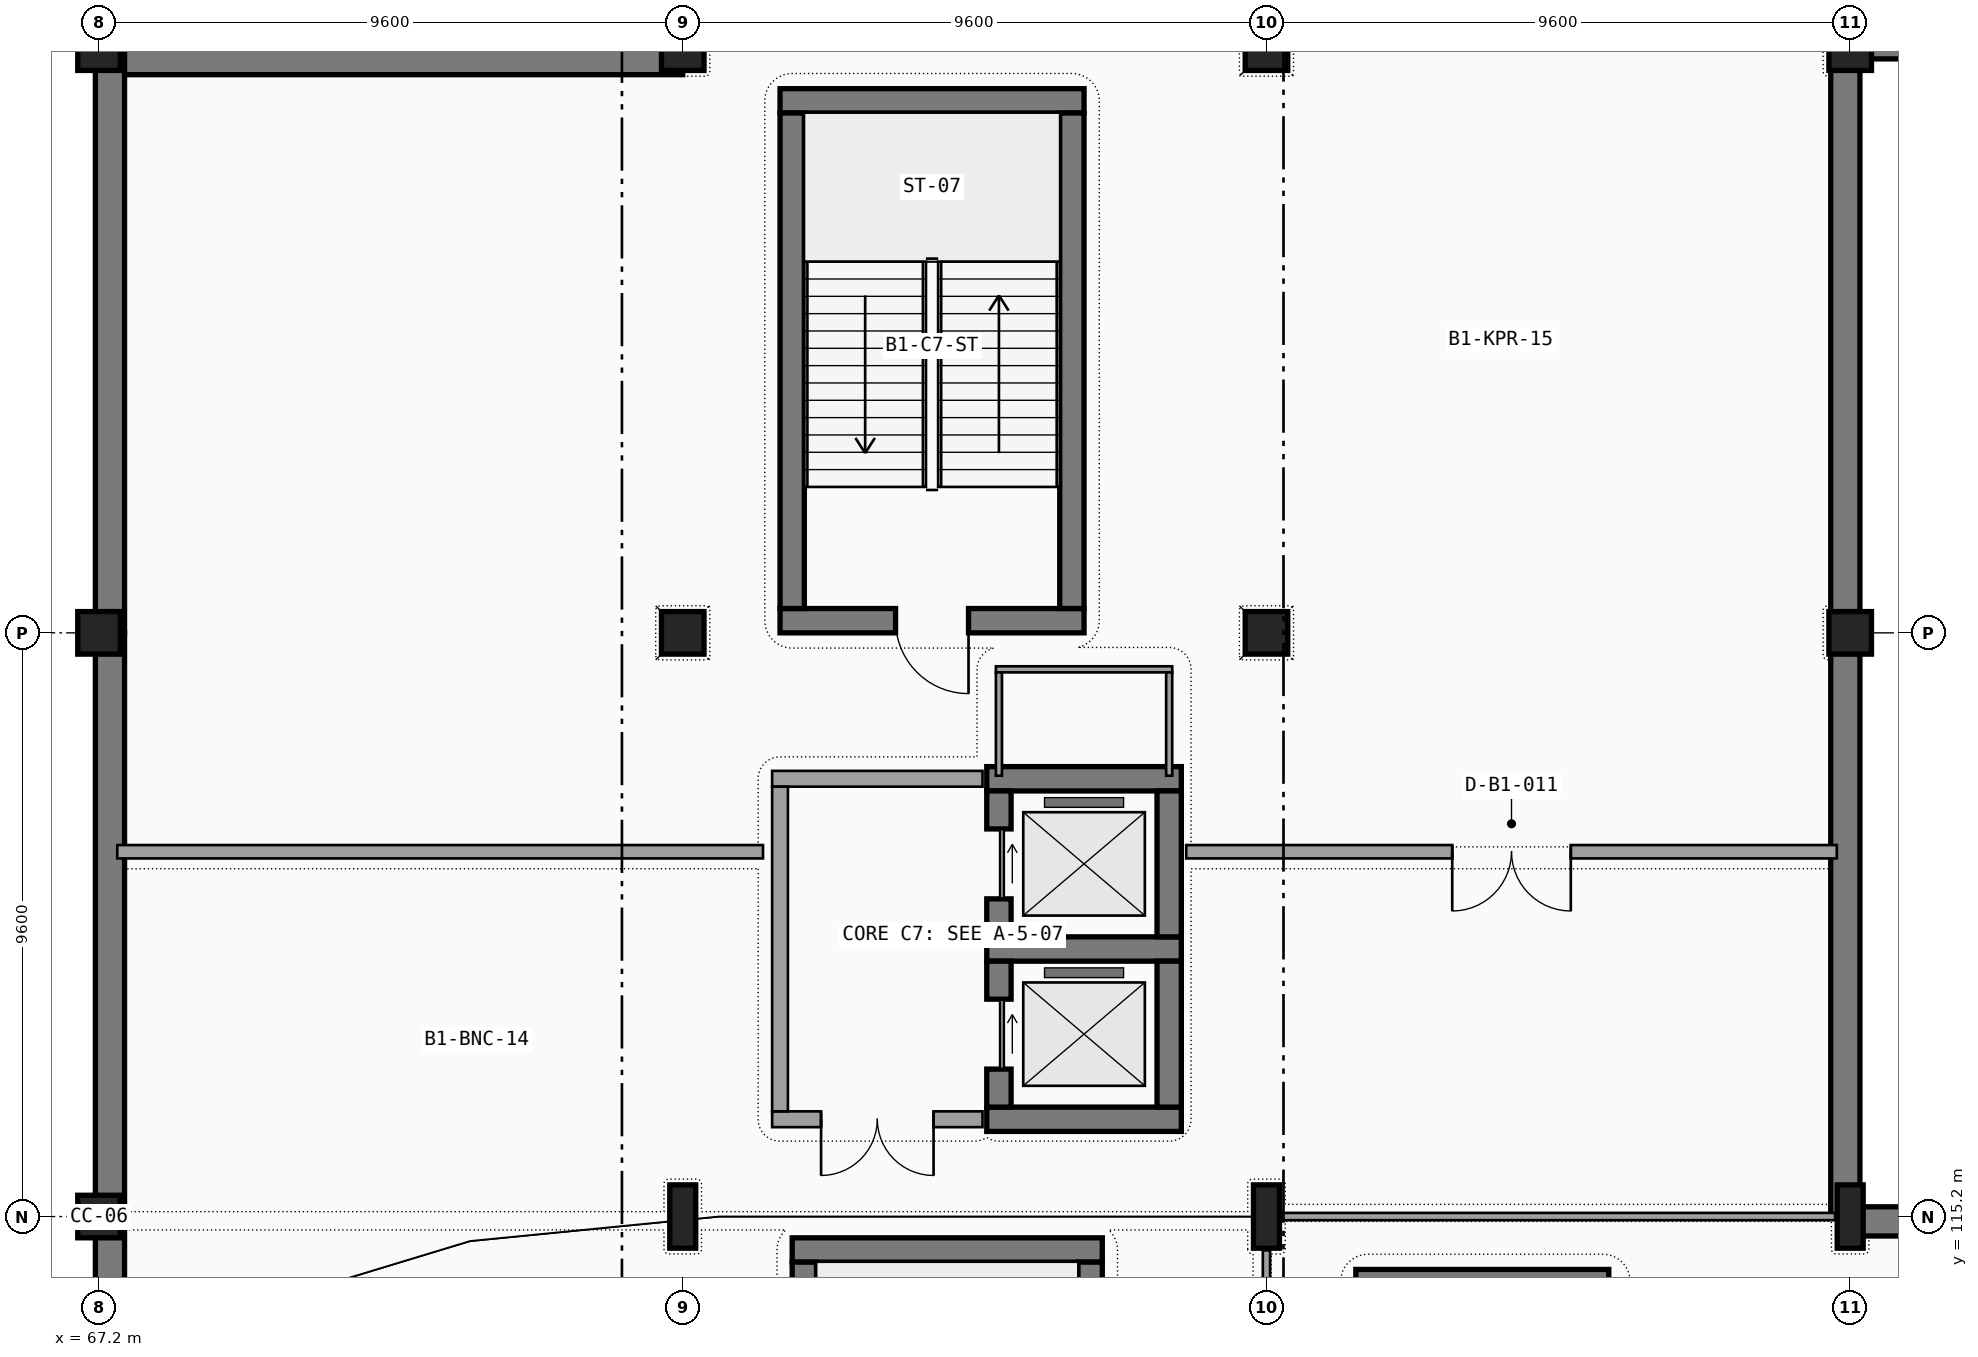
"""IFC4 building model, lengths in metres.
Left out: names, types, materials, properties, quantities, classifications, styles, units other than length and angle.
Written with IfcOpenShell. Run it as: python <this file> out.ifc"""

import sys

from ifc_helpers import new_model, si_unit, direction, frame, frame_2d, origin, origin_2d, place, context, subcontext, project, spatial, rectangle, i_section, extrude, element, fill, save


model = new_model("IFC4")
c1 = context("Model", 3, precision=1e-05, world=origin(), true_north=direction((0.0, 1.0)))
c2 = subcontext(c1, "Body", "Model", "MODEL_VIEW")
j1 = project(units=[si_unit("LENGTHUNIT", "METRE"), si_unit("PLANEANGLEUNIT", "RADIAN")], contexts=[c1])
p1 = place(None, origin())
s1 = spatial("IfcSite", under=j1, at=p1, CompositionType="ELEMENT")
p2 = place(p1, origin())
s2 = spatial("IfcBuilding", under=s1, at=p2, CompositionType="ELEMENT")
p3 = place(p2, frame((0.0, 0.0, -4.8)))
s3 = spatial("IfcBuildingStorey", under=s2, at=p3, CompositionType="ELEMENT", Elevation=-4.8)
for number, where, z_axis, x_axis in (
    (1, (67.2, 115.2, 0.0), (0.0, 0.0, 1.0), (1.0, 0.0, 0.0)),
    (2, (67.2, 124.8, 0.0), (0.0, 0.0, 1.0), (1.0, 0.0, 0.0)),
    (3, (67.2, 134.4, 0.0), (0.0, 0.0, 1.0), (1.0, 0.0, 0.0)),
):
    element("IfcColumn", number, at=place(p3, frame(where, z_axis=z_axis, x_axis=x_axis)), inside=s3, PredefinedType="COLUMN", context=c2, shape_type="SweptSolid", body=[
        extrude(rectangle(XDim=0.7, YDim=0.7, at=origin_2d()), origin(), (0.0, 0.0, 1.0), 4.8),
    ])
p4 = place(p3, frame((76.8, 115.2, 0.0), z_axis=(0.0, 0.0, 1.0), x_axis=(1.0, 0.0, 0.0)))
e4 = element("IfcColumn", 4, at=p4, inside=s3, PredefinedType="COLUMN", context=c2, shape_type="SweptSolid", body=[
    extrude(i_section(OverallWidth=0.427, OverallDepth=1.042, WebThickness=0.031, FlangeThickness=0.056, FilletRadius=0.031, at=origin_2d()), origin(), (0.0, 0.0, 1.0), 4.8),
])
for number, where, z_axis, x_axis in (
    (5, (76.8, 124.8, 0.0), (0.0, 0.0, 1.0), (1.0, 0.0, 0.0)),
    (6, (76.8, 134.4, 0.0), (0.0, 0.0, 1.0), (1.0, 0.0, 0.0)),
):
    element("IfcColumn", number, at=place(p3, frame(where, z_axis=z_axis, x_axis=x_axis)), inside=s3, PredefinedType="COLUMN", context=c2, shape_type="SweptSolid", body=[
        extrude(rectangle(XDim=0.7, YDim=0.7, at=origin_2d()), origin(), (0.0, 0.0, 1.0), 4.8),
    ])
p5 = place(p3, frame((86.4, 115.2, 0.0), z_axis=(0.0, 0.0, 1.0), x_axis=(1.0, 0.0, 0.0)))
e7 = element("IfcColumn", 7, at=p5, inside=s3, PredefinedType="COLUMN", context=c2, shape_type="SweptSolid", body=[
    extrude(i_section(OverallWidth=0.427, OverallDepth=1.042, WebThickness=0.031, FlangeThickness=0.056, FilletRadius=0.031, at=origin_2d()), origin(), (0.0, 0.0, 1.0), 4.8),
])
for number, where, z_axis, x_axis in (
    (8, (86.4, 124.8, 0.0), (0.0, 0.0, 1.0), (1.0, 0.0, 0.0)),
    (9, (86.4, 134.4, 0.0), (0.0, 0.0, 1.0), (1.0, 0.0, 0.0)),
):
    element("IfcColumn", number, at=place(p3, frame(where, z_axis=z_axis, x_axis=x_axis)), inside=s3, PredefinedType="COLUMN", context=c2, shape_type="SweptSolid", body=[
        extrude(rectangle(XDim=0.7, YDim=0.7, at=origin_2d()), origin(), (0.0, 0.0, 1.0), 4.8),
    ])
p6 = place(p3, frame((96.0, 115.2, 0.0), z_axis=(0.0, 0.0, 1.0), x_axis=(1.0, 0.0, 0.0)))
e10 = element("IfcColumn", 10, at=p6, inside=s3, PredefinedType="COLUMN", context=c2, shape_type="SweptSolid", body=[
    extrude(i_section(OverallWidth=0.427, OverallDepth=1.042, WebThickness=0.031, FlangeThickness=0.056, FilletRadius=0.031, at=origin_2d()), origin(), (0.0, 0.0, 1.0), 4.8),
])
for number, where, z_axis, x_axis in (
    (11, (96.0, 124.8, 0.0), (0.0, 0.0, 1.0), (1.0, 0.0, 0.0)),
    (12, (96.0, 134.4, 0.0), (0.0, 0.0, 1.0), (1.0, 0.0, 0.0)),
):
    element("IfcColumn", number, at=place(p3, frame(where, z_axis=z_axis, x_axis=x_axis)), inside=s3, PredefinedType="COLUMN", context=c2, shape_type="SweptSolid", body=[
        extrude(rectangle(XDim=0.7, YDim=0.7, at=origin_2d()), origin(), (0.0, 0.0, 1.0), 4.8),
    ])
p7 = place(p3, frame((76.8, 134.22, 0.0), z_axis=(0.0, 0.0, 1.0), x_axis=(-1.0, 0.0, 0.0)))
e13 = element("IfcWall", 13, at=p7, inside=s3, PredefinedType="USERDEFINED", context=c2, shape_type="SweptSolid", body=[
    extrude(rectangle(XDim=9.6, YDim=0.48, at=frame_2d((4.8, 0.0))), origin(), (0.0, 0.0, 1.0), 3.654),
])
p8 = place(p3, frame((67.38, 134.4, 0.0), z_axis=(0.0, 0.0, 1.0), x_axis=(0.0, -1.0, 0.0)))
e14 = element("IfcWall", 14, at=p8, inside=s3, PredefinedType="USERDEFINED", context=c2, shape_type="SweptSolid", body=[
    extrude(rectangle(XDim=9.6, YDim=0.48, at=frame_2d((4.8, 0.0))), origin(), (0.0, 0.0, 1.0), 3.7),
])
p9 = place(p3, frame((67.38, 124.8, 0.0), z_axis=(0.0, 0.0, 1.0), x_axis=(0.0, -1.0, 0.0)))
e15 = element("IfcWall", 15, at=p9, inside=s3, PredefinedType="USERDEFINED", context=c2, shape_type="SweptSolid", body=[
    extrude(rectangle(XDim=9.6, YDim=0.48, at=frame_2d((4.8, 0.0))), origin(), (0.0, 0.0, 1.0), 3.7),
])
p10 = place(p3, frame((67.38, 115.2, 0.0), z_axis=(0.0, 0.0, 1.0), x_axis=(0.0, -1.0, 0.0)))
e16 = element("IfcWall", 16, at=p10, inside=s3, PredefinedType="USERDEFINED", context=c2, shape_type="SweptSolid", body=[
    extrude(rectangle(XDim=2.875, YDim=0.48, at=frame_2d((1.438, 0.0))), origin(), (0.0, 0.0, 1.0), 3.7),
])
p11 = place(p3, frame((96.0, 134.48, 0.0), z_axis=(0.0, 0.0, 1.0), x_axis=(1.0, 0.0, 0.0)))
e17 = element("IfcWall", 17, at=p11, inside=s3, PredefinedType="USERDEFINED", context=c2, shape_type="SweptSolid", body=[
    extrude(rectangle(XDim=9.6, YDim=0.48, at=frame_2d((4.8, 0.0))), origin(), (0.0, 0.0, 1.0), 3.654),
])
for number, where, z_axis, x_axis in (
    (18, (105.6, 115.12, 0.0), (0.0, 0.0, 1.0), (-1.0, 0.0, 0.0)),
    (19, (95.92, 115.2, 0.0), (0.0, 0.0, 1.0), (0.0, 1.0, 0.0)),
):
    element("IfcWall", number, at=place(p3, frame(where, z_axis=z_axis, x_axis=x_axis)), inside=s3, PredefinedType="USERDEFINED", context=c2, shape_type="SweptSolid", body=[
        extrude(rectangle(XDim=9.6, YDim=0.48, at=frame_2d((4.8, 0.0))), origin(), (0.0, 0.0, 1.0), 3.573),
    ])
p12 = place(p3, frame((95.92, 124.8, 0.0), z_axis=(0.0, 0.0, 1.0), x_axis=(0.0, 1.0, 0.0)))
e20 = element("IfcWall", 20, at=p12, inside=s3, PredefinedType="USERDEFINED", context=c2, shape_type="SweptSolid", body=[
    extrude(rectangle(XDim=9.6, YDim=0.48, at=frame_2d((4.8, 0.0))), origin(), (0.0, 0.0, 1.0), 3.7),
])
p13 = place(p3, frame((78.4, 125.0, 0.0), z_axis=(0.0, 0.0, 1.0), x_axis=(1.0, 0.0, 0.0)))
e21 = element("IfcWall", 21, at=p13, inside=s3, PredefinedType="SHEAR", context=c2, shape_type="SweptSolid", body=[
    extrude(rectangle(XDim=5.0, YDim=0.4, at=frame_2d((2.5, 0.0))), origin(), (0.0, 0.0, 1.0), 4.5),
])
p14 = place(p13, frame((3.1, 0.0, 0.0), z_axis=(0.0, 0.0, 1.0), x_axis=(-1.0, 0.0, 0.0)))
e22 = element("IfcOpeningElement", 22, at=p14, cuts=e21, PredefinedType="OPENING", context=c2, shape_type="SweptSolid", body=[
    extrude(rectangle(XDim=1.2, YDim=2.2, at=frame_2d((0.6, 1.1))), frame((0.0, 0.21, 0.0), z_axis=(0.0, -1.0, 0.0), x_axis=(1.0, 0.0, 0.0)), (0.0, 0.0, 1.0), 0.42),
])
p15 = place(p3, frame((83.4, 133.55, 0.0), z_axis=(0.0, 0.0, 1.0), x_axis=(-1.0, 0.0, 0.0)))
e23 = element("IfcWall", 23, at=p15, inside=s3, PredefinedType="SHEAR", context=c2, shape_type="SweptSolid", body=[
    extrude(rectangle(XDim=5.0, YDim=0.4, at=frame_2d((2.5, 0.0))), origin(), (0.0, 0.0, 1.0), 4.5),
])
for number, where, z_axis, x_axis in (
    (24, (78.6, 133.35, 0.0), (0.0, 0.0, 1.0), (0.0, -1.0, 0.0)),
    (25, (83.2, 125.2, 0.0), (0.0, 0.0, 1.0), (0.0, 1.0, 0.0)),
):
    element("IfcWall", number, at=place(p3, frame(where, z_axis=z_axis, x_axis=x_axis)), inside=s3, PredefinedType="SHEAR", context=c2, shape_type="SweptSolid", body=[
        extrude(rectangle(XDim=8.15, YDim=0.4, at=frame_2d((4.075, 0.0))), origin(), (0.0, 0.0, 1.0), 4.5),
    ])
for number, where, z_axis, x_axis in (
    (26, (81.8, 116.8, 0.0), (0.0, 0.0, 1.0), (1.0, 0.0, 0.0)),
    (27, (85.0, 119.6, 0.0), (0.0, 0.0, 1.0), (-1.0, 0.0, 0.0)),
):
    element("IfcWall", number, at=place(p3, frame(where, z_axis=z_axis, x_axis=x_axis)), inside=s3, PredefinedType="SHEAR", context=c2, shape_type="SweptSolid", body=[
        extrude(rectangle(XDim=3.2, YDim=0.4, at=frame_2d((1.6, 0.0))), origin(), (0.0, 0.0, 1.0), 4.5),
    ])
p16 = place(p3, frame((82.0, 119.4, 0.0), z_axis=(0.0, 0.0, 1.0), x_axis=(0.0, -1.0, 0.0)))
e28 = element("IfcWall", 28, at=p16, inside=s3, PredefinedType="SHEAR", context=c2, shape_type="SweptSolid", body=[
    extrude(rectangle(XDim=2.4, YDim=0.4, at=frame_2d((1.2, 0.0))), origin(), (0.0, 0.0, 1.0), 4.5),
])
p17 = place(p16, frame((0.625, 0.0, 0.0), z_axis=(0.0, 0.0, 1.0), x_axis=(1.0, 0.0, 0.0)))
e29 = element("IfcOpeningElement", 29, at=p17, cuts=e28, PredefinedType="OPENING", context=c2, shape_type="SweptSolid", body=[
    extrude(rectangle(XDim=1.15, YDim=2.2, at=frame_2d((0.575, 1.1))), frame((0.0, 0.21, 0.0), z_axis=(0.0, -1.0, 0.0), x_axis=(1.0, 0.0, 0.0)), (0.0, 0.0, 1.0), 0.42),
])
p18 = place(p3, frame((84.8, 117.0, 0.0), z_axis=(0.0, 0.0, 1.0), x_axis=(0.0, 1.0, 0.0)))
e30 = element("IfcWall", 30, at=p18, inside=s3, PredefinedType="SHEAR", context=c2, shape_type="SweptSolid", body=[
    extrude(rectangle(XDim=2.4, YDim=0.4, at=frame_2d((1.2, 0.0))), origin(), (0.0, 0.0, 1.0), 4.5),
])
p19 = place(p3, frame((85.0, 122.4, 0.0), z_axis=(0.0, 0.0, 1.0), x_axis=(-1.0, 0.0, 0.0)))
e31 = element("IfcWall", 31, at=p19, inside=s3, PredefinedType="SHEAR", context=c2, shape_type="SweptSolid", body=[
    extrude(rectangle(XDim=3.2, YDim=0.4, at=frame_2d((1.6, 0.0))), origin(), (0.0, 0.0, 1.0), 4.5),
])
p20 = place(p3, frame((82.0, 122.2, 0.0), z_axis=(0.0, 0.0, 1.0), x_axis=(0.0, -1.0, 0.0)))
e32 = element("IfcWall", 32, at=p20, inside=s3, PredefinedType="SHEAR", context=c2, shape_type="SweptSolid", body=[
    extrude(rectangle(XDim=2.4, YDim=0.4, at=frame_2d((1.2, 0.0))), origin(), (0.0, 0.0, 1.0), 4.5),
])
p21 = place(p20, frame((0.625, 0.0, 0.0), z_axis=(0.0, 0.0, 1.0), x_axis=(1.0, 0.0, 0.0)))
e33 = element("IfcOpeningElement", 33, at=p21, cuts=e32, PredefinedType="OPENING", context=c2, shape_type="SweptSolid", body=[
    extrude(rectangle(XDim=1.15, YDim=2.2, at=frame_2d((0.575, 1.1))), frame((0.0, 0.21, 0.0), z_axis=(0.0, -1.0, 0.0), x_axis=(1.0, 0.0, 0.0)), (0.0, 0.0, 1.0), 0.42),
])
p22 = place(p3, frame((84.8, 119.8, 0.0), z_axis=(0.0, 0.0, 1.0), x_axis=(0.0, 1.0, 0.0)))
e34 = element("IfcWall", 34, at=p22, inside=s3, PredefinedType="SHEAR", context=c2, shape_type="SweptSolid", body=[
    extrude(rectangle(XDim=2.4, YDim=0.4, at=frame_2d((1.2, 0.0))), origin(), (0.0, 0.0, 1.0), 4.5),
])
p23 = place(p3, frame((84.85, 124.2, 0.0), z_axis=(0.0, 0.0, 1.0), x_axis=(-1.0, 0.0, 0.0)))
e35 = element("IfcWall", 35, at=p23, inside=s3, PredefinedType="PARTITIONING", context=c2, shape_type="SweptSolid", body=[
    extrude(rectangle(XDim=2.9, YDim=0.1, at=frame_2d((1.45, 0.0))), origin(), (0.0, 0.0, 1.0), 4.5),
])
for number, where, z_axis, x_axis in (
    (36, (82.0, 124.15, 0.0), (0.0, 0.0, 1.0), (0.0, -1.0, 0.0)),
    (37, (84.8, 122.45, 0.0), (0.0, 0.0, 1.0), (0.0, 1.0, 0.0)),
):
    element("IfcWall", number, at=place(p3, frame(where, z_axis=z_axis, x_axis=x_axis)), inside=s3, PredefinedType="PARTITIONING", context=c2, shape_type="SweptSolid", body=[
        extrude(rectangle(XDim=1.7, YDim=0.1, at=frame_2d((0.85, 0.0))), origin(), (0.0, 0.0, 1.0), 4.5),
    ])
p24 = place(p3, frame((78.27, 116.8, 0.0), z_axis=(0.0, 0.0, 1.0), x_axis=(1.0, 0.0, 0.0)))
e38 = element("IfcWall", 38, at=p24, inside=s3, PredefinedType="SOLIDWALL", context=c2, shape_type="SweptSolid", body=[
    extrude(rectangle(XDim=3.46, YDim=0.26, at=frame_2d((1.73, 0.0))), origin(), (0.0, 0.0, 1.0), 4.5),
])
p25 = place(p24, frame((2.655, 0.0, 0.0), z_axis=(0.0, 0.0, 1.0), x_axis=(-1.0, 0.0, 0.0)))
e39 = element("IfcOpeningElement", 39, at=p25, cuts=e38, PredefinedType="OPENING", context=c2, shape_type="SweptSolid", body=[
    extrude(rectangle(XDim=1.85, YDim=2.25, at=frame_2d((0.925, 1.125))), frame((0.0, 0.14, 0.0), z_axis=(0.0, -1.0, 0.0), x_axis=(1.0, 0.0, 0.0)), (0.0, 0.0, 1.0), 0.28),
])
p26 = place(p3, frame((81.73, 122.4, 0.0), z_axis=(0.0, 0.0, 1.0), x_axis=(-1.0, 0.0, 0.0)))
e40 = element("IfcWall", 40, at=p26, inside=s3, PredefinedType="SOLIDWALL", context=c2, shape_type="SweptSolid", body=[
    extrude(rectangle(XDim=3.46, YDim=0.26, at=frame_2d((1.73, 0.0))), origin(), (0.0, 0.0, 1.0), 4.5),
])
p27 = place(p3, frame((78.4, 122.27, 0.0), z_axis=(0.0, 0.0, 1.0), x_axis=(0.0, -1.0, 0.0)))
e41 = element("IfcWall", 41, at=p27, inside=s3, PredefinedType="SOLIDWALL", context=c2, shape_type="SweptSolid", body=[
    extrude(rectangle(XDim=5.34, YDim=0.26, at=frame_2d((2.67, 0.0))), origin(), (0.0, 0.0, 1.0), 4.5),
])
p28 = place(p3, frame((83.7, 114.65, 0.0), z_axis=(0.0, 0.0, 1.0), x_axis=(-1.0, 0.0, 0.0)))
e42 = element("IfcWall", 42, at=p28, inside=s3, PredefinedType="SHEAR", context=c2, shape_type="SweptSolid", body=[
    extrude(rectangle(XDim=5.1, YDim=0.4, at=frame_2d((2.55, 0.0))), origin(), (0.0, 0.0, 1.0), 4.5),
])
for number, where, z_axis, x_axis in (
    (43, (78.8, 114.45, 0.0), (0.0, 0.0, 1.0), (0.0, -1.0, 0.0)),
    (44, (83.5, 106.3, 0.0), (0.0, 0.0, 1.0), (0.0, 1.0, 0.0)),
):
    element("IfcWall", number, at=place(p3, frame(where, z_axis=z_axis, x_axis=x_axis)), inside=s3, PredefinedType="SHEAR", context=c2, shape_type="SweptSolid", body=[
        extrude(rectangle(XDim=8.15, YDim=0.4, at=frame_2d((4.075, 0.0))), origin(), (0.0, 0.0, 1.0), 4.5),
    ])
p29 = place(p3, frame((92.03, 114.13, 0.0), z_axis=(0.0, 0.0, 1.0), x_axis=(-1.0, 0.0, 0.0)))
e45 = element("IfcWall", 45, at=p29, inside=s3, PredefinedType="SHEAR", context=c2, shape_type="SweptSolid", body=[
    extrude(rectangle(XDim=4.16, YDim=0.4, at=frame_2d((2.08, 0.0))), origin(), (0.0, 0.0, 1.0), 4.5),
])
p30 = place(p3, frame((86.4, 106.2, 0.0), z_axis=(0.0, 0.0, 1.0), x_axis=(0.0, 1.0, 0.0)))
e46 = element("IfcWall", 46, at=p30, inside=s3, PredefinedType="PARTITIONING", context=c2, shape_type="SweptSolid", body=[
    extrude(rectangle(XDim=8.444, YDim=0.12, at=frame_2d((4.222, 0.0))), origin(), (0.0, 0.0, 1.0), 3.7),
])
p31 = place(p30, frame((3.715, 0.0, 0.0), z_axis=(0.0, 0.0, 1.0), x_axis=(1.0, 0.0, 0.0)))
e47 = element("IfcOpeningElement", 47, at=p31, cuts=e46, PredefinedType="OPENING", context=c2, shape_type="SweptSolid", body=[
    extrude(rectangle(XDim=0.95, YDim=2.15, at=frame_2d((0.475, 1.075))), frame((0.0, 0.07, 0.0), z_axis=(0.0, -1.0, 0.0), x_axis=(1.0, 0.0, 0.0)), (0.0, 0.0, 1.0), 0.14),
])
p32 = place(p3, frame((86.648, 115.2, 0.0), z_axis=(0.0, 0.0, 1.0), x_axis=(1.0, 0.0, 0.0)))
e48 = element("IfcWall", 48, at=p32, inside=s3, PredefinedType="PARTITIONING", context=c2, shape_type="SweptSolid", body=[
    extrude(rectangle(XDim=9.103, YDim=0.12, at=frame_2d((4.552, 0.0))), origin(), (0.0, 0.0, 1.0), 3.573),
])
p33 = place(p3, frame((95.78, 121.2, 0.0), z_axis=(0.0, 0.0, 1.0), x_axis=(-1.0, 0.0, 0.0)))
e49 = element("IfcWall", 49, at=p33, inside=s3, PredefinedType="PARTITIONING", context=c2, shape_type="SweptSolid", body=[
    extrude(rectangle(XDim=10.7, YDim=0.22, at=frame_2d((5.35, 0.0))), origin(), (0.0, 0.0, 1.0), 3.7),
])
p34 = place(p33, frame((4.375, 0.0, 0.0), z_axis=(0.0, 0.0, 1.0), x_axis=(1.0, 0.0, 0.0)))
e50 = element("IfcOpeningElement", 50, at=p34, cuts=e49, PredefinedType="OPENING", context=c2, shape_type="SweptSolid", body=[
    extrude(rectangle(XDim=1.95, YDim=2.35, at=frame_2d((0.975, 1.175))), frame((0.0, 0.12, 0.0), z_axis=(0.0, -1.0, 0.0), x_axis=(1.0, 0.0, 0.0)), (0.0, 0.0, 1.0), 0.24),
])
p35 = place(p3, frame((78.12, 121.2, 0.0), z_axis=(0.0, 0.0, 1.0), x_axis=(-1.0, 0.0, 0.0)))
e51 = element("IfcWall", 51, at=p35, inside=s3, PredefinedType="PARTITIONING", context=c2, shape_type="SweptSolid", body=[
    extrude(rectangle(XDim=10.62, YDim=0.22, at=frame_2d((5.31, 0.0))), origin(), (0.0, 0.0, 1.0), 3.7),
])
p36 = place(p14, origin())
e52 = element("IfcDoor", 52, at=p36, inside=s3, OperationType="SINGLE_SWING_LEFT", PredefinedType="DOOR", context=c2, shape_type="SweptSolid", body=[
    extrude(rectangle(XDim=1.2, YDim=2.2, at=frame_2d((0.6, 1.1))), frame((0.0, 0.025, 0.0), z_axis=(0.0, -1.0, 0.0), x_axis=(1.0, 0.0, 0.0)), (0.0, 0.0, 1.0), 0.05),
])
fill(e22, e52)
p37 = place(p17, origin())
e53 = element("IfcDoor", 53, at=p37, inside=s3, OperationType="SLIDING_TO_LEFT", PredefinedType="DOOR", context=c2, shape_type="SweptSolid", body=[
    extrude(rectangle(XDim=1.15, YDim=2.2, at=frame_2d((0.575, 1.1))), frame((0.0, 0.025, 0.0), z_axis=(0.0, -1.0, 0.0), x_axis=(1.0, 0.0, 0.0)), (0.0, 0.0, 1.0), 0.05),
])
fill(e29, e53)
p38 = place(p21, origin())
e54 = element("IfcDoor", 54, at=p38, inside=s3, OperationType="SLIDING_TO_LEFT", PredefinedType="DOOR", context=c2, shape_type="SweptSolid", body=[
    extrude(rectangle(XDim=1.15, YDim=2.2, at=frame_2d((0.575, 1.1))), frame((0.0, 0.025, 0.0), z_axis=(0.0, -1.0, 0.0), x_axis=(1.0, 0.0, 0.0)), (0.0, 0.0, 1.0), 0.05),
])
fill(e33, e54)
p39 = place(p25, origin())
e55 = element("IfcDoor", 55, at=p39, inside=s3, OperationType="DOUBLE_DOOR_SINGLE_SWING", PredefinedType="DOOR", context=c2, shape_type="SweptSolid", body=[
    extrude(rectangle(XDim=1.85, YDim=2.25, at=frame_2d((0.925, 1.125))), frame((0.0, 0.025, 0.0), z_axis=(0.0, -1.0, 0.0), x_axis=(1.0, 0.0, 0.0)), (0.0, 0.0, 1.0), 0.05),
])
fill(e39, e55)
p40 = place(p34, origin())
e56 = element("IfcDoor", 56, at=p40, inside=s3, OperationType="DOUBLE_DOOR_SINGLE_SWING", PredefinedType="DOOR", context=c2, shape_type="SweptSolid", body=[
    extrude(rectangle(XDim=1.95, YDim=2.35, at=frame_2d((0.975, 1.175))), frame((0.0, 0.025, 0.0), z_axis=(0.0, -1.0, 0.0), x_axis=(1.0, 0.0, 0.0)), (0.0, 0.0, 1.0), 0.05),
])
fill(e50, e56)
save(model, sys.argv[1])
